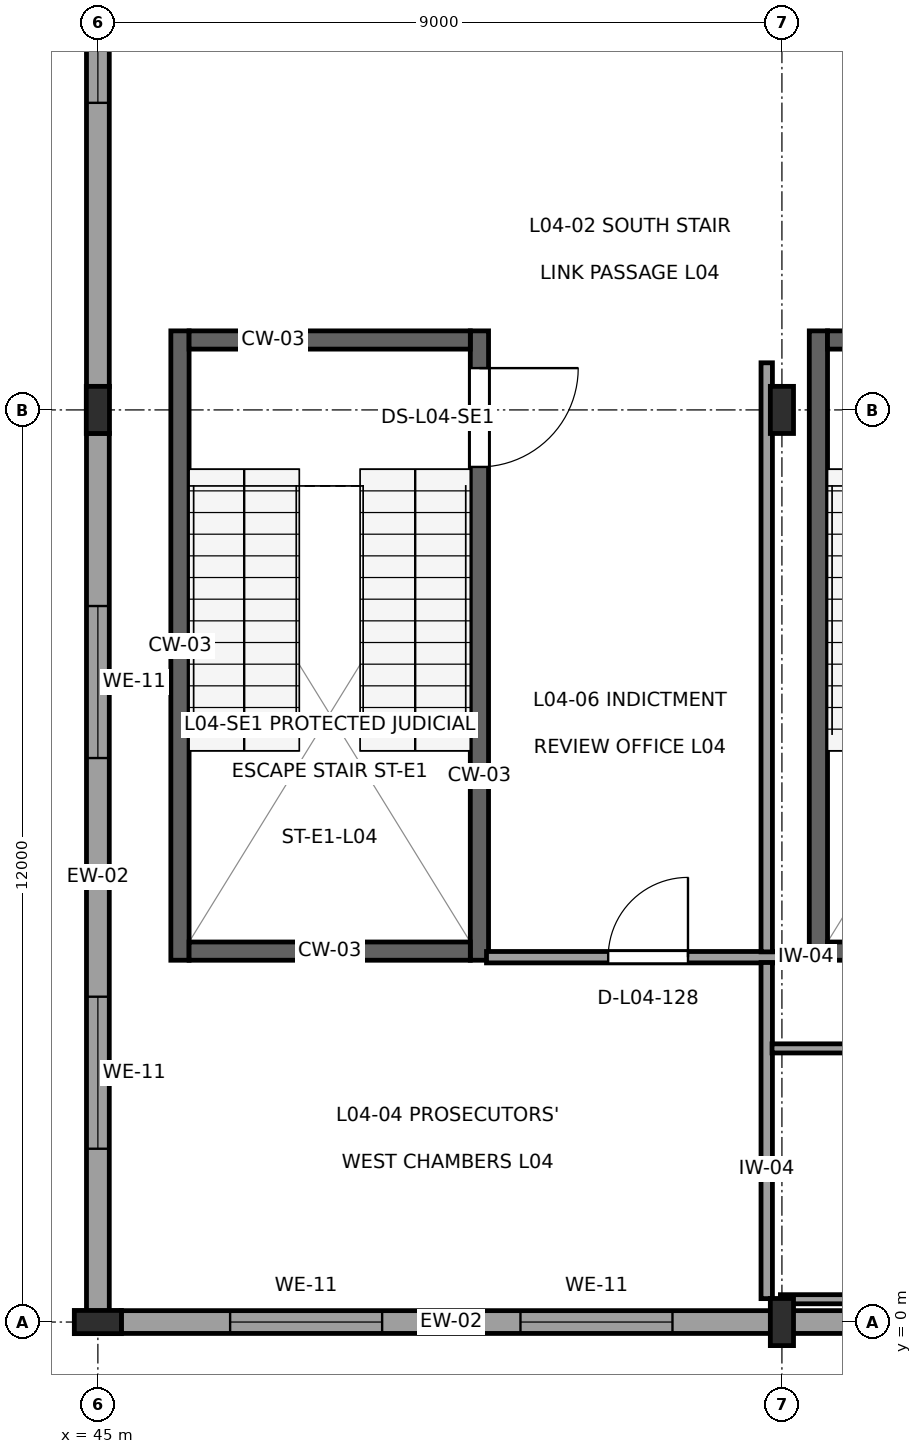
"""IFC4 building model, lengths in metres.
Left out: names, types, materials, properties, quantities, classifications, styles, units other than length and angle.
Written with IfcOpenShell. Run it as: python <this file> out.ifc"""

import sys

from ifc_helpers import new_model, si_unit, direction, frame, frame_2d, origin, origin_2d, place, context, subcontext, project, spatial, rectangle, i_section, extrude, element, fill, save


model = new_model("IFC4")
c1 = context("Model", 3, precision=1e-05, world=origin(), true_north=direction((0.0, 1.0)))
c2 = subcontext(c1, "Body", "Model", "MODEL_VIEW")
j1 = project(units=[si_unit("LENGTHUNIT", "METRE"), si_unit("PLANEANGLEUNIT", "RADIAN")], contexts=[c1])
p1 = place(None, origin())
s1 = spatial("IfcSite", under=j1, at=p1, CompositionType="ELEMENT")
p2 = place(p1, origin())
s2 = spatial("IfcBuilding", under=s1, at=p2, CompositionType="ELEMENT")
p3 = place(p2, frame((0.0, 0.0, 18.9)))
s3 = spatial("IfcBuildingStorey", under=s2, at=p3, CompositionType="ELEMENT", Elevation=18.9)
for number, where, z_axis, x_axis in (
    (1, (45.0, 0.0, 0.0), (0.0, 0.0, 1.0), (0.0, 1.0, 0.0)),
    (2, (45.0, 12.0, 0.0), (0.0, 0.0, 1.0), (1.0, 0.0, 0.0)),
    (3, (54.0, 0.0, 0.0), (0.0, 0.0, 1.0), (1.0, 0.0, 0.0)),
    (4, (54.0, 12.0, 0.0), (0.0, 0.0, 1.0), (1.0, 0.0, 0.0)),
):
    element("IfcColumn", number, at=place(p3, frame(where, z_axis=z_axis, x_axis=x_axis)), inside=s3, PredefinedType="COLUMN", context=c2, shape_type="SweptSolid", body=[
        extrude(i_section(OverallWidth=0.305, OverallDepth=0.62, WebThickness=0.021, FlangeThickness=0.04, at=origin_2d()), origin(), (0.0, 0.0, 1.0), 4.5),
    ])
p4 = place(p3, frame((45.308, 0.0, 0.0), z_axis=(0.0, 0.0, 1.0), x_axis=(1.0, 0.0, 0.0)))
e5 = element("IfcWall", 5, at=p4, inside=s3, PredefinedType="SOLIDWALL", context=c2, shape_type="SweptSolid", body=[
    extrude(rectangle(XDim=8.684, YDim=0.3, at=frame_2d((4.342, 0.0))), origin(), (0.0, 0.0, 1.0), 3.655),
])
p5 = place(p4, frame((1.432, 0.0, 0.85)))
e6 = element("IfcOpeningElement", 6, at=p5, cuts=e5, PredefinedType="OPENING", context=c2, shape_type="SweptSolid", body=[
    extrude(rectangle(XDim=2.0, YDim=2.0, at=frame_2d((1.0, 1.0))), frame((0.0, 0.165, 0.0), z_axis=(0.0, -1.0, 0.0), x_axis=(1.0, 0.0, 0.0)), (0.0, 0.0, 1.0), 0.33),
])
p6 = place(p4, frame((5.252, 0.0, 0.85)))
e7 = element("IfcOpeningElement", 7, at=p6, cuts=e5, PredefinedType="OPENING", context=c2, shape_type="SweptSolid", body=[
    extrude(rectangle(XDim=2.0, YDim=2.0, at=frame_2d((1.0, 1.0))), frame((0.0, 0.165, 0.0), z_axis=(0.0, -1.0, 0.0), x_axis=(1.0, 0.0, 0.0)), (0.0, 0.0, 1.0), 0.33),
])
p7 = place(p3, frame((54.008, 0.0, 0.0), z_axis=(0.0, 0.0, 1.0), x_axis=(1.0, 0.0, 0.0)))
e8 = element("IfcWall", 8, at=p7, inside=s3, PredefinedType="SOLIDWALL", context=c2, shape_type="SweptSolid", body=[
    extrude(rectangle(XDim=8.984, YDim=0.3, at=frame_2d((4.492, 0.0))), origin(), (0.0, 0.0, 1.0), 3.655),
])
p8 = place(p7, frame((1.516, 0.0, 0.85)))
e9 = element("IfcOpeningElement", 9, at=p8, cuts=e8, PredefinedType="OPENING", context=c2, shape_type="SweptSolid", body=[
    extrude(rectangle(XDim=2.0, YDim=2.0, at=frame_2d((1.0, 1.0))), frame((0.0, 0.165, 0.0), z_axis=(0.0, -1.0, 0.0), x_axis=(1.0, 0.0, 0.0)), (0.0, 0.0, 1.0), 0.33),
])
p9 = place(p7, frame((5.468, 0.0, 0.85)))
e10 = element("IfcOpeningElement", 10, at=p9, cuts=e8, PredefinedType="OPENING", context=c2, shape_type="SweptSolid", body=[
    extrude(rectangle(XDim=2.0, YDim=2.0, at=frame_2d((1.0, 1.0))), frame((0.0, 0.165, 0.0), z_axis=(0.0, -1.0, 0.0), x_axis=(1.0, 0.0, 0.0)), (0.0, 0.0, 1.0), 0.33),
])
p10 = place(p3, frame((45.0, 23.644, 0.0), z_axis=(0.0, 0.0, 1.0), x_axis=(0.0, -1.0, 0.0)))
e11 = element("IfcWall", 11, at=p10, inside=s3, PredefinedType="SOLIDWALL", context=c2, shape_type="SweptSolid", body=[
    extrude(rectangle(XDim=11.336, YDim=0.3, at=frame_2d((5.668, 0.0))), origin(), (0.0, 0.0, 1.0), 3.705),
])
p11 = place(p10, frame((2.174, 0.0, 0.85)))
e12 = element("IfcOpeningElement", 12, at=p11, cuts=e11, PredefinedType="OPENING", context=c2, shape_type="SweptSolid", body=[
    extrude(rectangle(XDim=2.0, YDim=2.0, at=frame_2d((1.0, 1.0))), frame((0.0, 0.165, 0.0), z_axis=(0.0, -1.0, 0.0), x_axis=(1.0, 0.0, 0.0)), (0.0, 0.0, 1.0), 0.33),
])
p12 = place(p10, frame((5.604, 0.0, 0.85)))
e13 = element("IfcOpeningElement", 13, at=p12, cuts=e11, PredefinedType="OPENING", context=c2, shape_type="SweptSolid", body=[
    extrude(rectangle(XDim=2.0, YDim=2.0, at=frame_2d((1.0, 1.0))), frame((0.0, 0.165, 0.0), z_axis=(0.0, -1.0, 0.0), x_axis=(1.0, 0.0, 0.0)), (0.0, 0.0, 1.0), 0.33),
])
p13 = place(p3, frame((45.0, 11.692, 0.0), z_axis=(0.0, 0.0, 1.0), x_axis=(0.0, -1.0, 0.0)))
e14 = element("IfcWall", 14, at=p13, inside=s3, PredefinedType="SOLIDWALL", context=c2, shape_type="SweptSolid", body=[
    extrude(rectangle(XDim=11.684, YDim=0.3, at=frame_2d((5.842, 0.0))), origin(), (0.0, 0.0, 1.0), 3.705),
])
p14 = place(p13, frame((2.272, 0.0, 0.85)))
e15 = element("IfcOpeningElement", 15, at=p14, cuts=e14, PredefinedType="OPENING", context=c2, shape_type="SweptSolid", body=[
    extrude(rectangle(XDim=2.0, YDim=2.0, at=frame_2d((1.0, 1.0))), frame((0.0, 0.165, 0.0), z_axis=(0.0, -1.0, 0.0), x_axis=(1.0, 0.0, 0.0)), (0.0, 0.0, 1.0), 0.33),
])
p15 = place(p13, frame((7.412, 0.0, 0.85)))
e16 = element("IfcOpeningElement", 16, at=p15, cuts=e14, PredefinedType="OPENING", context=c2, shape_type="SweptSolid", body=[
    extrude(rectangle(XDim=2.0, YDim=2.0, at=frame_2d((1.0, 1.0))), frame((0.0, 0.165, 0.0), z_axis=(0.0, -1.0, 0.0), x_axis=(1.0, 0.0, 0.0)), (0.0, 0.0, 1.0), 0.33),
])
p16 = place(p3, frame((54.48, 4.76, 0.0), z_axis=(0.0, 0.0, 1.0), x_axis=(0.0, 1.0, 0.0)))
e17 = element("IfcWall", 17, at=p16, inside=s3, PredefinedType="SHEAR", context=c2, shape_type="SweptSolid", body=[
    extrude(rectangle(XDim=8.28, YDim=0.24, at=frame_2d((4.14, 0.0))), origin(), (0.0, 0.0, 1.0), 4.31),
])
for number, where, z_axis, x_axis in (
    (18, (54.6, 4.88, 0.0), (0.0, 0.0, 1.0), (1.0, 0.0, 0.0)),
    (19, (54.6, 12.92, 0.0), (0.0, 0.0, 1.0), (1.0, 0.0, 0.0)),
):
    element("IfcWall", number, at=place(p3, frame(where, z_axis=z_axis, x_axis=x_axis)), inside=s3, PredefinedType="SHEAR", context=c2, shape_type="SweptSolid", body=[
        extrude(rectangle(XDim=3.7, YDim=0.24, at=frame_2d((1.85, 0.0))), origin(), (0.0, 0.0, 1.0), 4.31),
    ])
p17 = place(p3, frame((46.08, 4.76, 0.0), z_axis=(0.0, 0.0, 1.0), x_axis=(0.0, 1.0, 0.0)))
e20 = element("IfcWall", 20, at=p17, inside=s3, PredefinedType="SHEAR", context=c2, shape_type="SweptSolid", body=[
    extrude(rectangle(XDim=8.28, YDim=0.24, at=frame_2d((4.14, 0.0))), origin(), (0.0, 0.0, 1.0), 4.31),
])
p18 = place(p3, frame((50.02, 4.76, 0.0), z_axis=(0.0, 0.0, 1.0), x_axis=(0.0, 1.0, 0.0)))
e21 = element("IfcWall", 21, at=p18, inside=s3, PredefinedType="SHEAR", context=c2, shape_type="SweptSolid", body=[
    extrude(rectangle(XDim=8.28, YDim=0.24, at=frame_2d((4.14, 0.0))), origin(), (0.0, 0.0, 1.0), 4.31),
])
p19 = place(p18, frame((6.49, 0.0, 0.0)))
e22 = element("IfcOpeningElement", 22, at=p19, cuts=e21, PredefinedType="OPENING", context=c2, shape_type="SweptSolid", body=[
    extrude(rectangle(XDim=1.3, YDim=2.2, at=frame_2d((0.65, 1.1))), frame((0.0, 0.135, 0.0), z_axis=(0.0, -1.0, 0.0), x_axis=(1.0, 0.0, 0.0)), (0.0, 0.0, 1.0), 0.27),
])
for number, where, z_axis, x_axis in (
    (23, (46.2, 4.88, 0.0), (0.0, 0.0, 1.0), (1.0, 0.0, 0.0)),
    (24, (46.2, 12.92, 0.0), (0.0, 0.0, 1.0), (1.0, 0.0, 0.0)),
):
    element("IfcWall", number, at=place(p3, frame(where, z_axis=z_axis, x_axis=x_axis)), inside=s3, PredefinedType="SHEAR", context=c2, shape_type="SweptSolid", body=[
        extrude(rectangle(XDim=3.7, YDim=0.24, at=frame_2d((1.85, 0.0))), origin(), (0.0, 0.0, 1.0), 4.31),
    ])
p20 = place(p3, frame((50.113, 4.8, 0.0), z_axis=(0.0, 0.0, 1.0), x_axis=(1.0, 0.0, 0.0)))
e25 = element("IfcWall", 25, at=p20, inside=s3, PredefinedType="PARTITIONING", context=c2, shape_type="SweptSolid", body=[
    extrude(rectangle(XDim=4.252, YDim=0.15, at=frame_2d((2.126, 0.0))), origin(), (0.0, 0.0, 1.0), 4.14),
])
p21 = place(p20, frame((1.601, 0.0, 0.0)))
e26 = element("IfcOpeningElement", 26, at=p21, cuts=e25, PredefinedType="OPENING", context=c2, shape_type="SweptSolid", body=[
    extrude(rectangle(XDim=1.05, YDim=2.25, at=frame_2d((0.525, 1.125))), frame((0.0, 0.09, 0.0), z_axis=(0.0, -1.0, 0.0), x_axis=(1.0, 0.0, 0.0)), (0.0, 0.0, 1.0), 0.18),
])
p22 = place(p3, frame((53.8, 4.73, 0.0), z_axis=(0.0, 0.0, 1.0), x_axis=(0.0, -1.0, 0.0)))
e27 = element("IfcWall", 27, at=p22, inside=s3, PredefinedType="PARTITIONING", context=c2, shape_type="SweptSolid", body=[
    extrude(rectangle(XDim=4.422, YDim=0.15, at=frame_2d((2.211, 0.0))), origin(), (0.0, 0.0, 1.0), 3.655),
])
p23 = place(p3, frame((107.721, 0.3, 0.0), z_axis=(0.0, 0.0, 1.0), x_axis=(-1.0, 0.0, 0.0)))
e28 = element("IfcWall", 28, at=p23, inside=s3, PredefinedType="PARTITIONING", context=c2, shape_type="SweptSolid", body=[
    extrude(rectangle(XDim=53.741, YDim=0.12, at=frame_2d((26.871, 0.0))), origin(), (0.0, 0.0, 1.0), 4.14),
])
p24 = place(p3, frame((53.87, 3.6, 0.0), z_axis=(0.0, 0.0, 1.0), x_axis=(1.0, 0.0, 0.0)))
e29 = element("IfcWall", 29, at=p24, inside=s3, PredefinedType="PARTITIONING", context=c2, shape_type="SweptSolid", body=[
    extrude(rectangle(XDim=63.25, YDim=0.12, at=frame_2d((31.625, 0.0))), origin(), (0.0, 0.0, 1.0), 4.14),
])
p25 = place(p24, frame((19.855, 0.0, 0.0)))
e30 = element("IfcOpeningElement", 30, at=p25, cuts=e29, PredefinedType="OPENING", context=c2, shape_type="SweptSolid", body=[
    extrude(rectangle(XDim=0.95, YDim=2.15, at=frame_2d((0.475, 1.075))), frame((0.0, 0.075, 0.0), z_axis=(0.0, -1.0, 0.0), x_axis=(1.0, 0.0, 0.0)), (0.0, 0.0, 1.0), 0.15),
])
p26 = place(p3, frame((53.8, 12.62, 0.0), z_axis=(0.0, 0.0, 1.0), x_axis=(0.0, -1.0, 0.0)))
e31 = element("IfcWall", 31, at=p26, inside=s3, PredefinedType="PARTITIONING", context=c2, shape_type="SweptSolid", body=[
    extrude(rectangle(XDim=7.75, YDim=0.15, at=frame_2d((3.875, 0.0))), origin(), (0.0, 0.0, 1.0), 3.655),
])
p27 = place(p5, origin())
e32 = element("IfcWindow", 32, at=p27, inside=s3, PartitioningType="SINGLE_PANEL", PredefinedType="WINDOW", context=c2, shape_type="SweptSolid", body=[
    extrude(rectangle(XDim=2.0, YDim=2.0, at=frame_2d((1.0, 1.0))), frame((0.0, 0.03, 0.0), z_axis=(0.0, -1.0, 0.0), x_axis=(1.0, 0.0, 0.0)), (0.0, 0.0, 1.0), 0.06),
])
fill(e6, e32)
p28 = place(p6, origin())
e33 = element("IfcWindow", 33, at=p28, inside=s3, PartitioningType="SINGLE_PANEL", PredefinedType="WINDOW", context=c2, shape_type="SweptSolid", body=[
    extrude(rectangle(XDim=2.0, YDim=2.0, at=frame_2d((1.0, 1.0))), frame((0.0, 0.03, 0.0), z_axis=(0.0, -1.0, 0.0), x_axis=(1.0, 0.0, 0.0)), (0.0, 0.0, 1.0), 0.06),
])
fill(e7, e33)
p29 = place(p12, origin())
e34 = element("IfcWindow", 34, at=p29, inside=s3, PartitioningType="SINGLE_PANEL", PredefinedType="WINDOW", context=c2, shape_type="SweptSolid", body=[
    extrude(rectangle(XDim=2.0, YDim=2.0, at=frame_2d((1.0, 1.0))), frame((0.0, 0.03, 0.0), z_axis=(0.0, -1.0, 0.0), x_axis=(1.0, 0.0, 0.0)), (0.0, 0.0, 1.0), 0.06),
])
fill(e13, e34)
p30 = place(p14, origin())
e35 = element("IfcWindow", 35, at=p30, inside=s3, PartitioningType="SINGLE_PANEL", PredefinedType="WINDOW", context=c2, shape_type="SweptSolid", body=[
    extrude(rectangle(XDim=2.0, YDim=2.0, at=frame_2d((1.0, 1.0))), frame((0.0, 0.03, 0.0), z_axis=(0.0, -1.0, 0.0), x_axis=(1.0, 0.0, 0.0)), (0.0, 0.0, 1.0), 0.06),
])
fill(e15, e35)
p31 = place(p15, origin())
e36 = element("IfcWindow", 36, at=p31, inside=s3, PartitioningType="SINGLE_PANEL", PredefinedType="WINDOW", context=c2, shape_type="SweptSolid", body=[
    extrude(rectangle(XDim=2.0, YDim=2.0, at=frame_2d((1.0, 1.0))), frame((0.0, 0.03, 0.0), z_axis=(0.0, -1.0, 0.0), x_axis=(1.0, 0.0, 0.0)), (0.0, 0.0, 1.0), 0.06),
])
fill(e16, e36)
p32 = place(p19, frame((1.3, 0.0, 0.0), z_axis=(0.0, 0.0, 1.0), x_axis=(-1.0, 0.0, 0.0)))
e37 = element("IfcDoor", 37, at=p32, inside=s3, OperationType="SINGLE_SWING_RIGHT", PredefinedType="DOOR", context=c2, shape_type="SweptSolid", body=[
    extrude(rectangle(XDim=1.3, YDim=2.2, at=frame_2d((0.65, 1.1))), frame((0.0, 0.025, 0.0), z_axis=(0.0, -1.0, 0.0), x_axis=(1.0, 0.0, 0.0)), (0.0, 0.0, 1.0), 0.05),
])
fill(e22, e37)
p33 = place(p21, origin())
e38 = element("IfcDoor", 38, at=p33, inside=s3, OperationType="SINGLE_SWING_RIGHT", PredefinedType="DOOR", context=c2, shape_type="SweptSolid", body=[
    extrude(rectangle(XDim=1.05, YDim=2.25, at=frame_2d((0.525, 1.125))), frame((0.0, 0.025, 0.0), z_axis=(0.0, -1.0, 0.0), x_axis=(1.0, 0.0, 0.0)), (0.0, 0.0, 1.0), 0.05),
])
fill(e26, e38)
save(model, sys.argv[1])
